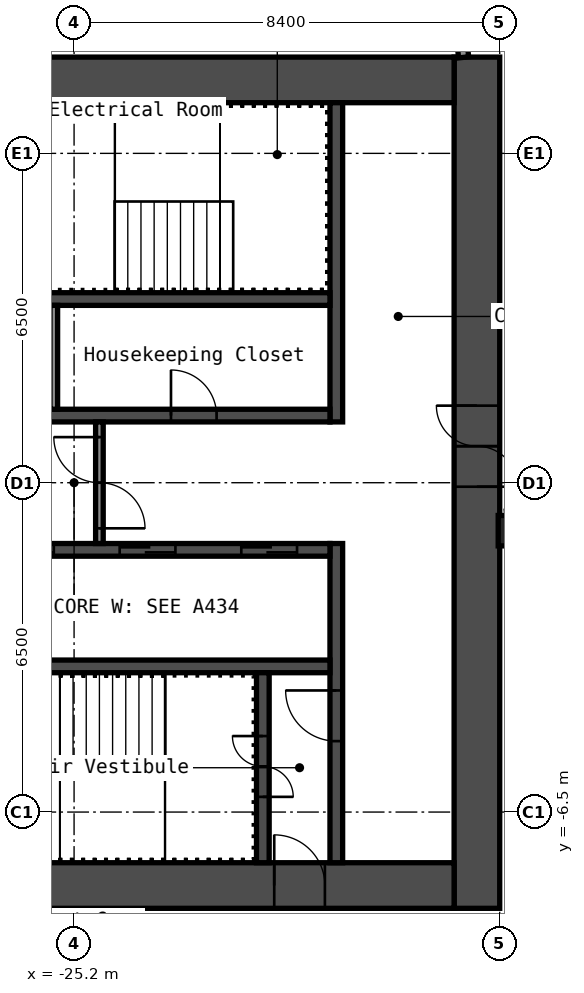
"""IFC4 building model, lengths in metres.
Left out: names, types, materials, properties, quantities, classifications, styles, units other than length and angle.
Written with IfcOpenShell. Run it as: python <this file> out.ifc"""

import sys

from ifc_helpers import new_model, si_unit, direction, frame, frame_2d, origin, origin_2d, place, context, subcontext, project, spatial, rectangle, hollow_rectangle, extrude, element, fill, save


model = new_model("IFC4")
c1 = context("Model", 3, precision=1e-05, world=origin(), true_north=direction((0.0, 1.0)))
c2 = subcontext(c1, "Body", "Model", "MODEL_VIEW")
j1 = project(units=[si_unit("LENGTHUNIT", "METRE"), si_unit("PLANEANGLEUNIT", "RADIAN")], contexts=[c1])
p1 = place(None, origin())
s1 = spatial("IfcSite", under=j1, at=p1, CompositionType="ELEMENT")
p2 = place(p1, origin())
s2 = spatial("IfcBuilding", under=s1, at=p2, CompositionType="ELEMENT")
p3 = place(p2, frame((0.0, 0.0, 232.6)))
s3 = spatial("IfcBuildingStorey", under=s2, at=p3, CompositionType="ELEMENT", Elevation=232.6)
p4 = place(p3, frame((-16.53, -0.947, 0.0), z_axis=(0.0, 0.0, 1.0), x_axis=(1.0, 0.0, 0.0)))
e1 = element("IfcColumn", 1, at=p4, inside=s3, PredefinedType="COLUMN", context=c2, shape_type="SweptSolid", body=[
    extrude(hollow_rectangle(XDim=0.6, YDim=0.6, WallThickness=0.025, InnerFilletRadius=0.038, OuterFilletRadius=0.062, at=origin_2d()), origin(), (0.0, 0.0, 1.0), 5.95),
])
p5 = place(p3, frame((-17.25, -8.4, 0.0), z_axis=(0.0, 0.0, 1.0), x_axis=(0.0, 1.0, 0.0)))
e2 = element("IfcWall", 2, at=p5, inside=s3, PredefinedType="SHEAR", context=c2, shape_type="SweptSolid", body=[
    extrude(rectangle(XDim=16.8, YDim=0.9, at=frame_2d((8.4, 0.0))), origin(), (0.0, 0.0, 1.0), 5.95),
])
p6 = place(p5, frame((8.321, 0.0, 0.0)))
e3 = element("IfcOpeningElement", 3, at=p6, cuts=e2, PredefinedType="OPENING", context=c2, shape_type="SweptSolid", body=[
    extrude(rectangle(XDim=1.6, YDim=2.1, at=frame_2d((0.8, 1.05))), frame((0.0, 0.46, 0.0), z_axis=(0.0, -1.0, 0.0), x_axis=(1.0, 0.0, 0.0)), (0.0, 0.0, 1.0), 0.92),
])
p7 = place(p3, frame((-32.7, 7.95, 0.0), z_axis=(0.0, 0.0, 1.0), x_axis=(1.0, 0.0, 0.0)))
e4 = element("IfcWall", 4, at=p7, inside=s3, PredefinedType="SHEAR", context=c2, shape_type="SweptSolid", body=[
    extrude(rectangle(XDim=15.0, YDim=0.9, at=frame_2d((7.5, 0.0))), origin(), (0.0, 0.0, 1.0), 5.95),
])
p8 = place(p7, frame((3.4, 0.0, 0.0)))
e5 = element("IfcOpeningElement", 5, at=p8, cuts=e4, PredefinedType="OPENING", context=c2, shape_type="SweptSolid", body=[
    extrude(rectangle(XDim=1.2, YDim=2.1, at=frame_2d((0.6, 1.05))), frame((0.0, 0.46, 0.0), z_axis=(0.0, -1.0, 0.0), x_axis=(1.0, 0.0, 0.0)), (0.0, 0.0, 1.0), 0.92),
])
p9 = place(p7, frame((0.75, 0.0, 0.0)))
e6 = element("IfcOpeningElement", 6, at=p9, cuts=e4, PredefinedType="OPENING", context=c2, shape_type="SweptSolid", body=[
    extrude(rectangle(XDim=0.9, YDim=2.1, at=frame_2d((0.45, 1.05))), frame((0.0, 0.46, 0.0), z_axis=(0.0, -1.0, 0.0), x_axis=(1.0, 0.0, 0.0)), (0.0, 0.0, 1.0), 0.92),
])
p10 = place(p3, frame((-32.7, -7.95, 0.0), z_axis=(0.0, 0.0, 1.0), x_axis=(1.0, 0.0, 0.0)))
e7 = element("IfcWall", 7, at=p10, inside=s3, PredefinedType="SHEAR", context=c2, shape_type="SweptSolid", body=[
    extrude(rectangle(XDim=15.0, YDim=0.9, at=frame_2d((7.5, 0.0))), origin(), (0.0, 0.0, 1.0), 5.95),
])
p11 = place(p10, frame((11.45, 0.0, 0.0)))
e8 = element("IfcOpeningElement", 8, at=p11, cuts=e7, PredefinedType="OPENING", context=c2, shape_type="SweptSolid", body=[
    extrude(rectangle(XDim=1.0, YDim=2.1, at=frame_2d((0.5, 1.05))), frame((0.0, 0.46, 0.0), z_axis=(0.0, -1.0, 0.0), x_axis=(1.0, 0.0, 0.0)), (0.0, 0.0, 1.0), 0.92),
])
p12 = place(p3, frame((-20.025, 1.2, 0.0), z_axis=(0.0, 0.0, 1.0), x_axis=(0.0, 1.0, 0.0)))
e9 = element("IfcWall", 9, at=p12, inside=s3, PredefinedType="SHEAR", context=c2, shape_type="SweptSolid", body=[
    extrude(rectangle(XDim=6.3, YDim=0.25, at=frame_2d((3.15, 0.0))), origin(), (0.0, 0.0, 1.0), 5.95),
])
p13 = place(p3, frame((-20.025, -7.5, 0.0), z_axis=(0.0, 0.0, 1.0), x_axis=(0.0, 1.0, 0.0)))
e10 = element("IfcWall", 10, at=p13, inside=s3, PredefinedType="SHEAR", context=c2, shape_type="SweptSolid", body=[
    extrude(rectangle(XDim=6.3, YDim=0.25, at=frame_2d((3.15, 0.0))), origin(), (0.0, 0.0, 1.0), 5.95),
])
p14 = place(p13, frame((2.4, 0.0, 0.0)))
e11 = element("IfcOpeningElement", 11, at=p14, cuts=e10, PredefinedType="OPENING", context=c2, shape_type="SweptSolid", body=[
    extrude(rectangle(XDim=1.0, YDim=2.1, at=frame_2d((0.5, 1.05))), frame((0.0, 0.135, 0.0), z_axis=(0.0, -1.0, 0.0), x_axis=(1.0, 0.0, 0.0)), (0.0, 0.0, 1.0), 0.27),
])
p15 = place(p3, frame((-27.65, 1.325, 0.0), z_axis=(0.0, 0.0, 1.0), x_axis=(1.0, 0.0, 0.0)))
e12 = element("IfcWall", 12, at=p15, inside=s3, PredefinedType="SHEAR", context=c2, shape_type="SweptSolid", body=[
    extrude(rectangle(XDim=7.5, YDim=0.25, at=frame_2d((3.75, 0.0))), origin(), (0.0, 0.0, 1.0), 5.95),
])
p16 = place(p15, frame((4.363, 0.0, 0.0)))
e13 = element("IfcOpeningElement", 13, at=p16, cuts=e12, PredefinedType="OPENING", context=c2, shape_type="SweptSolid", body=[
    extrude(rectangle(XDim=0.9, YDim=2.1, at=frame_2d((0.45, 1.05))), frame((0.0, 0.135, 0.0), z_axis=(0.0, -1.0, 0.0), x_axis=(1.0, 0.0, 0.0)), (0.0, 0.0, 1.0), 0.27),
])
p17 = place(p15, frame((0.663, 0.0, 0.0)))
e14 = element("IfcOpeningElement", 14, at=p17, cuts=e12, PredefinedType="OPENING", context=c2, shape_type="SweptSolid", body=[
    extrude(rectangle(XDim=0.9, YDim=2.1, at=frame_2d((0.45, 1.05))), frame((0.0, 0.135, 0.0), z_axis=(0.0, -1.0, 0.0), x_axis=(1.0, 0.0, 0.0)), (0.0, 0.0, 1.0), 0.27),
])
p18 = place(p3, frame((-27.65, 3.625, 0.0), z_axis=(0.0, 0.0, 1.0), x_axis=(1.0, 0.0, 0.0)))
e15 = element("IfcWall", 15, at=p18, inside=s3, PredefinedType="SHEAR", context=c2, shape_type="SweptSolid", body=[
    extrude(rectangle(XDim=7.5, YDim=0.25, at=frame_2d((3.75, 0.0))), origin(), (0.0, 0.0, 1.0), 5.95),
])
p19 = place(p3, frame((-27.65, -1.325, 0.0), z_axis=(0.0, 0.0, 1.0), x_axis=(1.0, 0.0, 0.0)))
e16 = element("IfcWall", 16, at=p19, inside=s3, PredefinedType="SHEAR", context=c2, shape_type="SweptSolid", body=[
    extrude(rectangle(XDim=7.5, YDim=0.25, at=frame_2d((3.75, 0.0))), origin(), (0.0, 0.0, 1.0), 5.95),
])
p20 = place(p19, frame((5.75, 0.0, 0.0)))
e17 = element("IfcOpeningElement", 17, at=p20, cuts=e16, PredefinedType="OPENING", context=c2, shape_type="SweptSolid", body=[
    extrude(rectangle(XDim=1.1, YDim=2.1, at=frame_2d((0.55, 1.05))), frame((0.0, 0.135, 0.0), z_axis=(0.0, -1.0, 0.0), x_axis=(1.0, 0.0, 0.0)), (0.0, 0.0, 1.0), 0.27),
])
p21 = place(p19, frame((3.35, 0.0, 0.0)))
e18 = element("IfcOpeningElement", 18, at=p21, cuts=e16, PredefinedType="OPENING", context=c2, shape_type="SweptSolid", body=[
    extrude(rectangle(XDim=1.1, YDim=2.1, at=frame_2d((0.55, 1.05))), frame((0.0, 0.135, 0.0), z_axis=(0.0, -1.0, 0.0), x_axis=(1.0, 0.0, 0.0)), (0.0, 0.0, 1.0), 0.27),
])
p22 = place(p19, frame((0.95, 0.0, 0.0)))
e19 = element("IfcOpeningElement", 19, at=p22, cuts=e16, PredefinedType="OPENING", context=c2, shape_type="SweptSolid", body=[
    extrude(rectangle(XDim=1.1, YDim=2.1, at=frame_2d((0.55, 1.05))), frame((0.0, 0.135, 0.0), z_axis=(0.0, -1.0, 0.0), x_axis=(1.0, 0.0, 0.0)), (0.0, 0.0, 1.0), 0.27),
])
p23 = place(p3, frame((-27.65, -3.625, 0.0), z_axis=(0.0, 0.0, 1.0), x_axis=(1.0, 0.0, 0.0)))
e20 = element("IfcWall", 20, at=p23, inside=s3, PredefinedType="SHEAR", context=c2, shape_type="SweptSolid", body=[
    extrude(rectangle(XDim=7.5, YDim=0.25, at=frame_2d((3.75, 0.0))), origin(), (0.0, 0.0, 1.0), 5.95),
])
p24 = place(p3, frame((-21.475, -7.5, 0.0), z_axis=(0.0, 0.0, 1.0), x_axis=(0.0, 1.0, 0.0)))
e21 = element("IfcWall", 21, at=p24, inside=s3, PredefinedType="SHEAR", context=c2, shape_type="SweptSolid", body=[
    extrude(rectangle(XDim=3.75, YDim=0.25, at=frame_2d((1.875, 0.0))), origin(), (0.0, 0.0, 1.0), 5.95),
])
p25 = place(p24, frame((1.3, 0.0, 0.0)))
e22 = element("IfcOpeningElement", 22, at=p25, cuts=e21, PredefinedType="OPENING", context=c2, shape_type="SweptSolid", body=[
    extrude(rectangle(XDim=1.2, YDim=2.1, at=frame_2d((0.6, 1.05))), frame((0.0, 0.135, 0.0), z_axis=(0.0, -1.0, 0.0), x_axis=(1.0, 0.0, 0.0)), (0.0, 0.0, 1.0), 0.27),
])
p26 = place(p3, frame((-24.7, -1.2, 0.0), z_axis=(0.0, 0.0, 1.0), x_axis=(0.0, 1.0, 0.0)))
e23 = element("IfcWall", 23, at=p26, inside=s3, PredefinedType="PARTITIONING", context=c2, shape_type="SweptSolid", body=[
    extrude(rectangle(XDim=2.4, YDim=0.15, at=frame_2d((1.2, 0.0))), origin(), (0.0, 0.0, 1.0), 5.95),
])
p27 = place(p26, frame((0.3, 0.0, 0.0)))
e24 = element("IfcOpeningElement", 24, at=p27, cuts=e23, PredefinedType="OPENING", context=c2, shape_type="SweptSolid", body=[
    extrude(rectangle(XDim=1.8, YDim=2.1, at=frame_2d((0.9, 1.05))), frame((0.0, 0.085, 0.0), z_axis=(0.0, -1.0, 0.0), x_axis=(1.0, 0.0, 0.0)), (0.0, 0.0, 1.0), 0.17),
])
p28 = place(p3, frame((-25.6, 1.45, 0.0), z_axis=(0.0, 0.0, 1.0), x_axis=(0.0, 1.0, 0.0)))
e25 = element("IfcWall", 25, at=p28, inside=s3, PredefinedType="PARTITIONING", context=c2, shape_type="SweptSolid", body=[
    extrude(rectangle(XDim=2.05, YDim=0.15, at=frame_2d((1.025, 0.0))), origin(), (0.0, 0.0, 1.0), 5.95),
])
p29 = place(p3, frame((-17.512, 8.395, 0.0), z_axis=(0.0, 0.0, 1.0), x_axis=(-0.104524714473, 0.994522289375, 0.0)))
e26 = element("IfcWall", 26, at=p29, inside=s3, PredefinedType="PARTITIONING", context=c2, shape_type="SweptSolid", body=[
    extrude(rectangle(XDim=9.607, YDim=0.2, at=frame_2d((4.803, 0.0))), origin(), (0.0, 0.0, 1.0), 5.95),
])
p30 = place(p6, origin())
e27 = element("IfcDoor", 27, at=p30, inside=s3, OperationType="DOUBLE_DOOR_SINGLE_SWING", PredefinedType="DOOR", context=c2, shape_type="SweptSolid", body=[
    extrude(rectangle(XDim=1.6, YDim=2.1, at=frame_2d((0.8, 1.05))), frame((0.0, 0.025, 0.0), z_axis=(0.0, -1.0, 0.0), x_axis=(1.0, 0.0, 0.0)), (0.0, 0.0, 1.0), 0.05),
])
fill(e3, e27)
p31 = place(p11, origin())
e28 = element("IfcDoor", 28, at=p31, inside=s3, OperationType="SINGLE_SWING_RIGHT", PredefinedType="DOOR", context=c2, shape_type="SweptSolid", body=[
    extrude(rectangle(XDim=1.0, YDim=2.1, at=frame_2d((0.5, 1.05))), frame((0.0, 0.025, 0.0), z_axis=(0.0, -1.0, 0.0), x_axis=(1.0, 0.0, 0.0)), (0.0, 0.0, 1.0), 0.05),
])
fill(e8, e28)
p32 = place(p25, origin())
e29 = element("IfcDoor", 29, at=p32, inside=s3, OperationType="DOUBLE_DOOR_SINGLE_SWING", PredefinedType="DOOR", context=c2, shape_type="SweptSolid", body=[
    extrude(rectangle(XDim=1.2, YDim=2.1, at=frame_2d((0.6, 1.05))), frame((0.0, 0.025, 0.0), z_axis=(0.0, -1.0, 0.0), x_axis=(1.0, 0.0, 0.0)), (0.0, 0.0, 1.0), 0.05),
])
fill(e22, e29)
p33 = place(p14, origin())
e30 = element("IfcDoor", 30, at=p33, inside=s3, OperationType="SINGLE_SWING_LEFT", PredefinedType="DOOR", context=c2, shape_type="SweptSolid", body=[
    extrude(rectangle(XDim=1.0, YDim=2.1, at=frame_2d((0.5, 1.05))), frame((0.0, 0.025, 0.0), z_axis=(0.0, -1.0, 0.0), x_axis=(1.0, 0.0, 0.0)), (0.0, 0.0, 1.0), 0.05),
])
fill(e11, e30)
p34 = place(p27, origin())
e31 = element("IfcDoor", 31, at=p34, inside=s3, OperationType="DOUBLE_DOOR_SINGLE_SWING", PredefinedType="DOOR", context=c2, shape_type="SweptSolid", body=[
    extrude(rectangle(XDim=1.8, YDim=2.1, at=frame_2d((0.9, 1.05))), frame((0.0, 0.025, 0.0), z_axis=(0.0, -1.0, 0.0), x_axis=(1.0, 0.0, 0.0)), (0.0, 0.0, 1.0), 0.05),
])
fill(e24, e31)
p35 = place(p16, origin())
e32 = element("IfcDoor", 32, at=p35, inside=s3, OperationType="SINGLE_SWING_RIGHT", PredefinedType="DOOR", context=c2, shape_type="SweptSolid", body=[
    extrude(rectangle(XDim=0.9, YDim=2.1, at=frame_2d((0.45, 1.05))), frame((0.0, 0.025, 0.0), z_axis=(0.0, -1.0, 0.0), x_axis=(1.0, 0.0, 0.0)), (0.0, 0.0, 1.0), 0.05),
])
fill(e13, e32)
p36 = place(p20, origin())
e33 = element("IfcDoor", 33, at=p36, inside=s3, OperationType="DOUBLE_DOOR_SLIDING", PredefinedType="DOOR", context=c2, shape_type="SweptSolid", body=[
    extrude(rectangle(XDim=1.1, YDim=2.1, at=frame_2d((0.55, 1.05))), frame((0.0, 0.025, 0.0), z_axis=(0.0, -1.0, 0.0), x_axis=(1.0, 0.0, 0.0)), (0.0, 0.0, 1.0), 0.05),
])
fill(e17, e33)
p37 = place(p21, origin())
e34 = element("IfcDoor", 34, at=p37, inside=s3, OperationType="DOUBLE_DOOR_SLIDING", PredefinedType="DOOR", context=c2, shape_type="SweptSolid", body=[
    extrude(rectangle(XDim=1.1, YDim=2.1, at=frame_2d((0.55, 1.05))), frame((0.0, 0.025, 0.0), z_axis=(0.0, -1.0, 0.0), x_axis=(1.0, 0.0, 0.0)), (0.0, 0.0, 1.0), 0.05),
])
fill(e18, e34)
p38 = place(p22, origin())
e35 = element("IfcDoor", 35, at=p38, inside=s3, OperationType="DOUBLE_DOOR_SLIDING", PredefinedType="DOOR", context=c2, shape_type="SweptSolid", body=[
    extrude(rectangle(XDim=1.1, YDim=2.1, at=frame_2d((0.55, 1.05))), frame((0.0, 0.025, 0.0), z_axis=(0.0, -1.0, 0.0), x_axis=(1.0, 0.0, 0.0)), (0.0, 0.0, 1.0), 0.05),
])
fill(e19, e35)
save(model, sys.argv[1])
